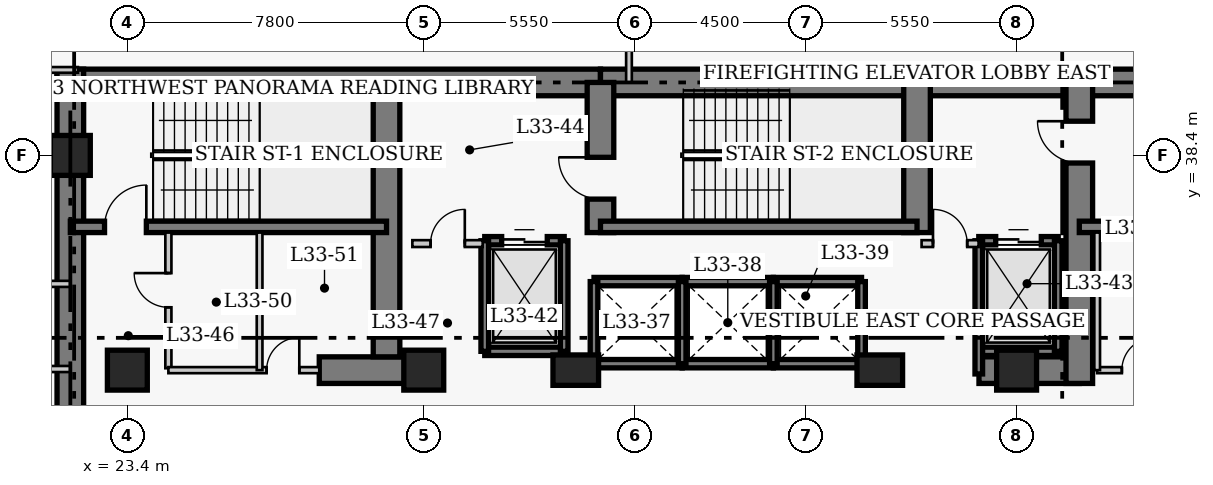
"""IFC4 building model, lengths in metres.
Left out: names, types, materials, properties, quantities, classifications, styles, units other than length and angle.
Written with IfcOpenShell. Run it as: python <this file> out.ifc"""

import sys

from ifc_helpers import new_model, si_unit, direction, frame, frame_2d, origin, origin_2d, place, context, subcontext, project, spatial, rectangle, extrude, element, fill, save


model = new_model("IFC4")
c1 = context("Model", 3, precision=1e-05, world=origin(), true_north=direction((0.0, 1.0)))
c2 = subcontext(c1, "Body", "Model", "MODEL_VIEW")
j1 = project(units=[si_unit("LENGTHUNIT", "METRE"), si_unit("PLANEANGLEUNIT", "RADIAN")], contexts=[c1])
p1 = place(None, origin())
s1 = spatial("IfcSite", under=j1, at=p1, CompositionType="ELEMENT")
p2 = place(p1, origin())
s2 = spatial("IfcBuilding", under=s1, at=p2, CompositionType="ELEMENT")
p3 = place(p2, frame((0.0, 0.0, 134.6)))
s3 = spatial("IfcBuildingStorey", under=s2, at=p3, CompositionType="ELEMENT", Elevation=134.6)
p4 = place(p3, frame((21.55, 40.32, 0.0), z_axis=(0.0, 0.0, 1.0), x_axis=(1.0, 0.0, 0.0)))
e1 = element("IfcWall", 1, at=p4, inside=s3, PredefinedType="SHEAR", context=c2, shape_type="SweptSolid", body=[
    extrude(rectangle(XDim=14.3, YDim=0.7, at=frame_2d((7.15, 0.0))), origin(), (0.0, 0.0, 1.0), 3.8),
])
p5 = place(p3, frame((35.85, 40.32, 0.0), z_axis=(0.0, 0.0, 1.0), x_axis=(1.0, 0.0, 0.0)))
e2 = element("IfcWall", 2, at=p5, inside=s3, PredefinedType="SHEAR", context=c2, shape_type="SweptSolid", body=[
    extrude(rectangle(XDim=12.6, YDim=0.7, at=frame_2d((6.3, 0.0))), origin(), (0.0, 0.0, 1.0), 3.8),
])
p6 = place(p3, frame((48.45, 40.32, 0.0), z_axis=(0.0, 0.0, 1.0), x_axis=(1.0, 0.0, 0.0)))
e3 = element("IfcWall", 3, at=p6, inside=s3, PredefinedType="SHEAR", context=c2, shape_type="SweptSolid", body=[
    extrude(rectangle(XDim=8.77, YDim=0.7, at=frame_2d((4.385, 0.0))), origin(), (0.0, 0.0, 1.0), 3.8),
])
p7 = place(p3, frame((21.9, 27.05, 0.0), z_axis=(0.0, 0.0, 1.0), x_axis=(0.0, 1.0, 0.0)))
e4 = element("IfcWall", 4, at=p7, inside=s3, PredefinedType="SHEAR", context=c2, shape_type="SweptSolid", body=[
    extrude(rectangle(XDim=13.62, YDim=0.7, at=frame_2d((6.81, 0.0))), origin(), (0.0, 0.0, 1.0), 3.8),
])
p8 = place(p3, frame((28.45, 32.75, 0.0), z_axis=(0.0, 0.0, 1.0), x_axis=(1.0, 0.0, 0.0)))
e5 = element("IfcWall", 5, at=p8, inside=s3, PredefinedType="SHEAR", context=c2, shape_type="SweptSolid", body=[
    extrude(rectangle(XDim=2.4, YDim=0.7, at=frame_2d((1.2, 0.0))), origin(), (0.0, 0.0, 1.0), 3.8),
])
p9 = place(p3, frame((45.81, 32.75, 0.0), z_axis=(0.0, 0.0, 1.0), x_axis=(1.0, 0.0, 0.0)))
e6 = element("IfcWall", 6, at=p9, inside=s3, PredefinedType="SHEAR", context=c2, shape_type="SweptSolid", body=[
    extrude(rectangle(XDim=2.64, YDim=0.7, at=frame_2d((1.32, 0.0))), origin(), (0.0, 0.0, 1.0), 3.8),
])
p10 = place(p3, frame((30.22, 33.1, 0.0), z_axis=(0.0, 0.0, 1.0), x_axis=(0.0, 1.0, 0.0)))
e7 = element("IfcWall", 7, at=p10, inside=s3, PredefinedType="SHEAR", context=c2, shape_type="SweptSolid", body=[
    extrude(rectangle(XDim=7.22, YDim=0.7, at=frame_2d((3.61, 0.0))), origin(), (0.0, 0.0, 1.0), 3.8),
])
p11 = place(p3, frame((35.85, 36.37, 0.0), z_axis=(0.0, 0.0, 1.0), x_axis=(0.0, 1.0, 0.0)))
e8 = element("IfcWall", 8, at=p11, inside=s3, PredefinedType="SHEAR", context=c2, shape_type="SweptSolid", body=[
    extrude(rectangle(XDim=3.95, YDim=0.7, at=frame_2d((1.975, 0.0))), origin(), (0.0, 0.0, 1.0), 3.8),
])
p12 = place(p11, frame((0.88, 0.0, 0.0)))
e9 = element("IfcOpeningElement", 9, at=p12, cuts=e8, PredefinedType="OPENING", context=c2, shape_type="SweptSolid", body=[
    extrude(rectangle(XDim=1.1, YDim=2.15, at=frame_2d((0.55, 1.075))), frame((0.0, 0.36, 0.0), z_axis=(0.0, -1.0, 0.0), x_axis=(1.0, 0.0, 0.0)), (0.0, 0.0, 1.0), 0.72),
])
p13 = place(p3, frame((44.18, 36.37, 0.0), z_axis=(0.0, 0.0, 1.0), x_axis=(0.0, 1.0, 0.0)))
e10 = element("IfcWall", 10, at=p13, inside=s3, PredefinedType="SHEAR", context=c2, shape_type="SweptSolid", body=[
    extrude(rectangle(XDim=3.95, YDim=0.7, at=frame_2d((1.975, 0.0))), origin(), (0.0, 0.0, 1.0), 3.8),
])
p14 = place(p3, frame((48.45, 32.4, 0.0), z_axis=(0.0, 0.0, 1.0), x_axis=(0.0, 1.0, 0.0)))
e11 = element("IfcWall", 11, at=p14, inside=s3, PredefinedType="SHEAR", context=c2, shape_type="SweptSolid", body=[
    extrude(rectangle(XDim=7.92, YDim=0.7, at=frame_2d((3.96, 0.0))), origin(), (0.0, 0.0, 1.0), 3.8),
])
p15 = place(p14, frame((5.8, 0.0, 0.0)))
e12 = element("IfcOpeningElement", 12, at=p15, cuts=e11, PredefinedType="OPENING", context=c2, shape_type="SweptSolid", body=[
    extrude(rectangle(XDim=1.1, YDim=2.15, at=frame_2d((0.55, 1.075))), frame((0.0, 0.36, 0.0), z_axis=(0.0, -1.0, 0.0), x_axis=(1.0, 0.0, 0.0)), (0.0, 0.0, 1.0), 0.72),
])
p16 = place(p3, frame((21.9, 36.52, 0.0), z_axis=(0.0, 0.0, 1.0), x_axis=(1.0, 0.0, 0.0)))
e13 = element("IfcWall", 13, at=p16, inside=s3, PredefinedType="SHEAR", context=c2, shape_type="SweptSolid", body=[
    extrude(rectangle(XDim=8.32, YDim=0.3, at=frame_2d((4.16, 0.0))), origin(), (0.0, 0.0, 1.0), 3.8),
])
p17 = place(p16, frame((0.9, 0.0, 0.0)))
e14 = element("IfcOpeningElement", 14, at=p17, cuts=e13, PredefinedType="OPENING", context=c2, shape_type="SweptSolid", body=[
    extrude(rectangle(XDim=1.1, YDim=2.15, at=frame_2d((0.55, 1.075))), frame((0.0, 0.16, 0.0), z_axis=(0.0, -1.0, 0.0), x_axis=(1.0, 0.0, 0.0)), (0.0, 0.0, 1.0), 0.32),
])
p18 = place(p3, frame((35.85, 36.52, 0.0), z_axis=(0.0, 0.0, 1.0), x_axis=(1.0, 0.0, 0.0)))
e15 = element("IfcWall", 15, at=p18, inside=s3, PredefinedType="SHEAR", context=c2, shape_type="SweptSolid", body=[
    extrude(rectangle(XDim=8.33, YDim=0.3, at=frame_2d((4.165, 0.0))), origin(), (0.0, 0.0, 1.0), 3.8),
])
p19 = place(p3, frame((48.45, 36.52, 0.0), z_axis=(0.0, 0.0, 1.0), x_axis=(1.0, 0.0, 0.0)))
e16 = element("IfcWall", 16, at=p19, inside=s3, PredefinedType="SHEAR", context=c2, shape_type="SweptSolid", body=[
    extrude(rectangle(XDim=8.42, YDim=0.3, at=frame_2d((4.21, 0.0))), origin(), (0.0, 0.0, 1.0), 3.8),
])
for number, where, z_axis, x_axis in (
    (17, (21.9, 38.4, 0.0), (0.0, 0.0, 1.0), (1.0, 0.0, 0.0)),
    (18, (23.4, 32.75, 0.0), (0.0, 0.0, 1.0), (1.0, 0.0, 0.0)),
    (19, (31.2, 32.75, 0.0), (0.0, 0.0, 1.0), (1.0, 0.0, 0.0)),
):
    element("IfcColumn", number, at=place(p3, frame(where, z_axis=z_axis, x_axis=x_axis)), inside=s3, PredefinedType="COLUMN", context=c2, shape_type="SweptSolid", body=[
        extrude(rectangle(XDim=1.05, YDim=1.05, at=origin_2d()), origin(), (0.0, 0.0, 1.0), 3.8),
    ])
for number, where, z_axis, x_axis in (
    (20, (35.2, 32.75, 0.0), (0.0, 0.0, 1.0), (1.0, 0.0, 0.0)),
    (21, (43.2, 32.75, 0.0), (0.0, 0.0, 1.0), (1.0, 0.0, 0.0)),
):
    element("IfcColumn", number, at=place(p3, frame(where, z_axis=z_axis, x_axis=x_axis)), inside=s3, PredefinedType="COLUMN", context=c2, shape_type="SweptSolid", body=[
        extrude(rectangle(XDim=1.2, YDim=0.8, at=origin_2d()), origin(), (0.0, 0.0, 1.0), 3.8),
    ])
p20 = place(p3, frame((46.8, 32.75, 0.0), z_axis=(0.0, 0.0, 1.0), x_axis=(1.0, 0.0, 0.0)))
e22 = element("IfcColumn", 22, at=p20, inside=s3, PredefinedType="COLUMN", context=c2, shape_type="SweptSolid", body=[
    extrude(rectangle(XDim=1.05, YDim=1.05, at=origin_2d()), origin(), (0.0, 0.0, 1.0), 3.8),
])
for number, where, z_axis, x_axis in (
    (23, (35.68, 35.08, 0.0), (0.0, 0.0, 1.0), (1.0, 0.0, 0.0)),
    (24, (35.68, 32.92, 0.0), (0.0, 0.0, 1.0), (1.0, 0.0, 0.0)),
):
    element("IfcWall", number, at=place(p3, frame(where, z_axis=z_axis, x_axis=x_axis)), inside=s3, PredefinedType="SHEAR", context=c2, shape_type="SweptSolid", body=[
        extrude(rectangle(XDim=2.32, YDim=0.22, at=frame_2d((1.16, 0.0))), origin(), (0.0, 0.0, 1.0), 3.8),
    ])
p21 = place(p3, frame((35.68, 32.92, 0.0), z_axis=(0.0, 0.0, 1.0), x_axis=(0.0, 1.0, 0.0)))
e25 = element("IfcWall", 25, at=p21, inside=s3, PredefinedType="SHEAR", context=c2, shape_type="SweptSolid", body=[
    extrude(rectangle(XDim=2.16, YDim=0.2, at=frame_2d((1.08, 0.0))), origin(), (0.0, 0.0, 1.0), 3.8),
])
for number, where, z_axis, x_axis in (
    (26, (38.0, 35.08, 0.0), (0.0, 0.0, 1.0), (1.0, 0.0, 0.0)),
    (27, (38.0, 32.92, 0.0), (0.0, 0.0, 1.0), (1.0, 0.0, 0.0)),
):
    element("IfcWall", number, at=place(p3, frame(where, z_axis=z_axis, x_axis=x_axis)), inside=s3, PredefinedType="SHEAR", context=c2, shape_type="SweptSolid", body=[
        extrude(rectangle(XDim=2.4, YDim=0.22, at=frame_2d((1.2, 0.0))), origin(), (0.0, 0.0, 1.0), 3.8),
    ])
p22 = place(p3, frame((38.0, 32.92, 0.0), z_axis=(0.0, 0.0, 1.0), x_axis=(0.0, 1.0, 0.0)))
e28 = element("IfcWall", 28, at=p22, inside=s3, PredefinedType="SHEAR", context=c2, shape_type="SweptSolid", body=[
    extrude(rectangle(XDim=2.16, YDim=0.2, at=frame_2d((1.08, 0.0))), origin(), (0.0, 0.0, 1.0), 3.8),
])
for number, where, z_axis, x_axis in (
    (29, (40.4, 35.08, 0.0), (0.0, 0.0, 1.0), (1.0, 0.0, 0.0)),
    (30, (40.4, 32.92, 0.0), (0.0, 0.0, 1.0), (1.0, 0.0, 0.0)),
):
    element("IfcWall", number, at=place(p3, frame(where, z_axis=z_axis, x_axis=x_axis)), inside=s3, PredefinedType="SHEAR", context=c2, shape_type="SweptSolid", body=[
        extrude(rectangle(XDim=2.32, YDim=0.22, at=frame_2d((1.16, 0.0))), origin(), (0.0, 0.0, 1.0), 3.8),
    ])
for number, where, z_axis, x_axis in (
    (31, (40.4, 32.92, 0.0), (0.0, 0.0, 1.0), (0.0, 1.0, 0.0)),
    (32, (42.72, 32.92, 0.0), (0.0, 0.0, 1.0), (0.0, 1.0, 0.0)),
):
    element("IfcWall", number, at=place(p3, frame(where, z_axis=z_axis, x_axis=x_axis)), inside=s3, PredefinedType="SHEAR", context=c2, shape_type="SweptSolid", body=[
        extrude(rectangle(XDim=2.16, YDim=0.2, at=frame_2d((1.08, 0.0))), origin(), (0.0, 0.0, 1.0), 3.8),
    ])
p23 = place(p3, frame((32.805, 36.155, 0.0), z_axis=(0.0, 0.0, 1.0), x_axis=(1.0, 0.0, 0.0)))
e33 = element("IfcWall", 33, at=p23, inside=s3, PredefinedType="SHEAR", context=c2, shape_type="SweptSolid", body=[
    extrude(rectangle(XDim=2.09, YDim=0.22, at=frame_2d((1.045, 0.0))), origin(), (0.0, 0.0, 1.0), 3.8),
])
p24 = place(p23, frame((0.445, 0.0, 0.0)))
e34 = element("IfcOpeningElement", 34, at=p24, cuts=e33, PredefinedType="OPENING", context=c2, shape_type="SweptSolid", body=[
    extrude(rectangle(XDim=1.2, YDim=2.15, at=frame_2d((0.6, 1.075))), frame((0.0, 0.12, 0.0), z_axis=(0.0, -1.0, 0.0), x_axis=(1.0, 0.0, 0.0)), (0.0, 0.0, 1.0), 0.24),
])
p25 = place(p3, frame((32.805, 33.245, 0.0), z_axis=(0.0, 0.0, 1.0), x_axis=(1.0, 0.0, 0.0)))
e35 = element("IfcWall", 35, at=p25, inside=s3, PredefinedType="SHEAR", context=c2, shape_type="SweptSolid", body=[
    extrude(rectangle(XDim=2.09, YDim=0.22, at=frame_2d((1.045, 0.0))), origin(), (0.0, 0.0, 1.0), 3.8),
])
for number, where, z_axis, x_axis in (
    (36, (32.805, 33.245, 0.0), (0.0, 0.0, 1.0), (0.0, 1.0, 0.0)),
    (37, (34.895, 33.245, 0.0), (0.0, 0.0, 1.0), (0.0, 1.0, 0.0)),
):
    element("IfcWall", number, at=place(p3, frame(where, z_axis=z_axis, x_axis=x_axis)), inside=s3, PredefinedType="SHEAR", context=c2, shape_type="SweptSolid", body=[
        extrude(rectangle(XDim=2.91, YDim=0.2, at=frame_2d((1.455, 0.0))), origin(), (0.0, 0.0, 1.0), 3.8),
    ])
p26 = place(p3, frame((45.805, 36.155, 0.0), z_axis=(0.0, 0.0, 1.0), x_axis=(1.0, 0.0, 0.0)))
e38 = element("IfcWall", 38, at=p26, inside=s3, PredefinedType="SHEAR", context=c2, shape_type="SweptSolid", body=[
    extrude(rectangle(XDim=2.09, YDim=0.22, at=frame_2d((1.045, 0.0))), origin(), (0.0, 0.0, 1.0), 3.8),
])
p27 = place(p26, frame((0.445, 0.0, 0.0)))
e39 = element("IfcOpeningElement", 39, at=p27, cuts=e38, PredefinedType="OPENING", context=c2, shape_type="SweptSolid", body=[
    extrude(rectangle(XDim=1.2, YDim=2.15, at=frame_2d((0.6, 1.075))), frame((0.0, 0.12, 0.0), z_axis=(0.0, -1.0, 0.0), x_axis=(1.0, 0.0, 0.0)), (0.0, 0.0, 1.0), 0.24),
])
p28 = place(p3, frame((45.805, 33.245, 0.0), z_axis=(0.0, 0.0, 1.0), x_axis=(1.0, 0.0, 0.0)))
e40 = element("IfcWall", 40, at=p28, inside=s3, PredefinedType="SHEAR", context=c2, shape_type="SweptSolid", body=[
    extrude(rectangle(XDim=2.09, YDim=0.22, at=frame_2d((1.045, 0.0))), origin(), (0.0, 0.0, 1.0), 3.8),
])
p29 = place(p3, frame((45.805, 32.65, 0.0), z_axis=(0.0, 0.0, 1.0), x_axis=(0.0, 1.0, 0.0)))
e41 = element("IfcWall", 41, at=p29, inside=s3, PredefinedType="SHEAR", context=c2, shape_type="SweptSolid", body=[
    extrude(rectangle(XDim=3.505, YDim=0.2, at=frame_2d((1.752, 0.0))), origin(), (0.0, 0.0, 1.0), 3.8),
])
p30 = place(p3, frame((47.895, 33.245, 0.0), z_axis=(0.0, 0.0, 1.0), x_axis=(0.0, 1.0, 0.0)))
e42 = element("IfcWall", 42, at=p30, inside=s3, PredefinedType="SHEAR", context=c2, shape_type="SweptSolid", body=[
    extrude(rectangle(XDim=2.91, YDim=0.2, at=frame_2d((1.455, 0.0))), origin(), (0.0, 0.0, 1.0), 3.8),
])
p31 = place(p3, frame((30.9, 36.08, 0.0), z_axis=(0.0, 0.0, 1.0), x_axis=(1.0, 0.0, 0.0)))
e43 = element("IfcWall", 43, at=p31, inside=s3, PredefinedType="PARTITIONING", context=c2, shape_type="SweptSolid", body=[
    extrude(rectangle(XDim=1.85, YDim=0.18, at=frame_2d((0.925, 0.0))), origin(), (0.0, 0.0, 1.0), 3.55),
])
p32 = place(p31, frame((0.48, 0.0, 0.0)))
e44 = element("IfcOpeningElement", 44, at=p32, cuts=e43, PredefinedType="OPENING", context=c2, shape_type="SweptSolid", body=[
    extrude(rectangle(XDim=0.9, YDim=2.15, at=frame_2d((0.45, 1.075))), frame((0.0, 0.1, 0.0), z_axis=(0.0, -1.0, 0.0), x_axis=(1.0, 0.0, 0.0)), (0.0, 0.0, 1.0), 0.2),
])
p33 = place(p3, frame((44.3, 36.08, 0.0), z_axis=(0.0, 0.0, 1.0), x_axis=(1.0, 0.0, 0.0)))
e45 = element("IfcWall", 45, at=p33, inside=s3, PredefinedType="PARTITIONING", context=c2, shape_type="SweptSolid", body=[
    extrude(rectangle(XDim=1.5, YDim=0.18, at=frame_2d((0.75, 0.0))), origin(), (0.0, 0.0, 1.0), 3.55),
])
p34 = place(p33, frame((0.3, 0.0, 0.0)))
e46 = element("IfcOpeningElement", 46, at=p34, cuts=e45, PredefinedType="OPENING", context=c2, shape_type="SweptSolid", body=[
    extrude(rectangle(XDim=0.9, YDim=2.15, at=frame_2d((0.45, 1.075))), frame((0.0, 0.1, 0.0), z_axis=(0.0, -1.0, 0.0), x_axis=(1.0, 0.0, 0.0)), (0.0, 0.0, 1.0), 0.2),
])
p35 = place(p3, frame((24.48, 32.8, 0.0), z_axis=(0.0, 0.0, 1.0), x_axis=(0.0, 1.0, 0.0)))
e47 = element("IfcWall", 47, at=p35, inside=s3, PredefinedType="PARTITIONING", context=c2, shape_type="SweptSolid", body=[
    extrude(rectangle(XDim=3.57, YDim=0.16, at=frame_2d((1.785, 0.0))), origin(), (0.0, 0.0, 1.0), 3.55),
])
p36 = place(p35, frame((1.604, 0.0, 0.0)))
e48 = element("IfcOpeningElement", 48, at=p36, cuts=e47, PredefinedType="OPENING", context=c2, shape_type="SweptSolid", body=[
    extrude(rectangle(XDim=0.9, YDim=2.1, at=frame_2d((0.45, 1.05))), frame((0.0, 0.09, 0.0), z_axis=(0.0, -1.0, 0.0), x_axis=(1.0, 0.0, 0.0)), (0.0, 0.0, 1.0), 0.18),
])
p37 = place(p3, frame((24.48, 32.75, 0.0), z_axis=(0.0, 0.0, 1.0), x_axis=(1.0, 0.0, 0.0)))
e49 = element("IfcWall", 49, at=p37, inside=s3, PredefinedType="PARTITIONING", context=c2, shape_type="SweptSolid", body=[
    extrude(rectangle(XDim=3.97, YDim=0.16, at=frame_2d((1.985, 0.0))), origin(), (0.0, 0.0, 1.0), 3.55),
])
p38 = place(p37, frame((2.585, 0.0, 0.0)))
e50 = element("IfcOpeningElement", 50, at=p38, cuts=e49, PredefinedType="OPENING", context=c2, shape_type="SweptSolid", body=[
    extrude(rectangle(XDim=0.86, YDim=2.05, at=frame_2d((0.43, 1.025))), frame((0.0, 0.09, 0.0), z_axis=(0.0, -1.0, 0.0), x_axis=(1.0, 0.0, 0.0)), (0.0, 0.0, 1.0), 0.18),
])
p39 = place(p3, frame((48.92, 32.75, 0.0), z_axis=(0.0, 0.0, 1.0), x_axis=(1.0, 0.0, 0.0)))
e51 = element("IfcWall", 51, at=p39, inside=s3, PredefinedType="PARTITIONING", context=c2, shape_type="SweptSolid", body=[
    extrude(rectangle(XDim=2.2, YDim=0.16, at=frame_2d((1.1, 0.0))), origin(), (0.0, 0.0, 1.0), 3.55),
])
p40 = place(p39, frame((0.65, 0.0, 0.0)))
e52 = element("IfcOpeningElement", 52, at=p40, cuts=e51, PredefinedType="OPENING", context=c2, shape_type="SweptSolid", body=[
    extrude(rectangle(XDim=0.86, YDim=2.05, at=frame_2d((0.43, 1.025))), frame((0.0, 0.09, 0.0), z_axis=(0.0, -1.0, 0.0), x_axis=(1.0, 0.0, 0.0)), (0.0, 0.0, 1.0), 0.18),
])
for number, where, z_axis, x_axis in (
    (53, (48.92, 32.75, 0.0), (0.0, 0.0, 1.0), (0.0, 1.0, 0.0)),
    (54, (26.88, 32.75, 0.0), (0.0, 0.0, 1.0), (0.0, 1.0, 0.0)),
):
    element("IfcWall", number, at=place(p3, frame(where, z_axis=z_axis, x_axis=x_axis)), inside=s3, PredefinedType="PARTITIONING", context=c2, shape_type="SweptSolid", body=[
        extrude(rectangle(XDim=3.62, YDim=0.15, at=frame_2d((1.81, 0.0))), origin(), (0.0, 0.0, 1.0), 3.55),
    ])
for number, where, z_axis, x_axis in (
    (55, (20.46, 35.02, 0.0), (0.0, 0.0, 1.0), (1.0, 0.0, 0.0)),
    (56, (20.46, 32.78, 0.0), (0.0, 0.0, 1.0), (1.0, 0.0, 0.0)),
):
    element("IfcWall", number, at=place(p3, frame(where, z_axis=z_axis, x_axis=x_axis)), inside=s3, PredefinedType="PARTITIONING", context=c2, shape_type="SweptSolid", body=[
        extrude(rectangle(XDim=1.44, YDim=0.16, at=frame_2d((0.72, 0.0))), origin(), (0.0, 0.0, 1.0), 3.55),
    ])
p41 = place(p3, frame((18.24, 40.65, 0.0), z_axis=(0.0, 0.0, 1.0), x_axis=(1.0, 0.0, 0.0)))
e57 = element("IfcWall", 57, at=p41, inside=s3, PredefinedType="PARTITIONING", context=c2, shape_type="SweptSolid", body=[
    extrude(rectangle(XDim=3.86, YDim=0.15, at=frame_2d((1.93, 0.0))), origin(), (0.0, 0.0, 1.0), 3.55),
])
p42 = place(p41, frame((0.55, 0.0, 0.0)))
e58 = element("IfcOpeningElement", 58, at=p42, cuts=e57, PredefinedType="OPENING", context=c2, shape_type="SweptSolid", body=[
    extrude(rectangle(XDim=1.0, YDim=2.15, at=frame_2d((0.5, 1.075))), frame((0.0, 0.085, 0.0), z_axis=(0.0, -1.0, 0.0), x_axis=(1.0, 0.0, 0.0)), (0.0, 0.0, 1.0), 0.17),
])
p43 = place(p3, frame((36.6, 40.32, 0.0), z_axis=(0.0, 0.0, 1.0), x_axis=(0.0, 1.0, 0.0)))
e59 = element("IfcWall", 59, at=p43, inside=s3, PredefinedType="PARTITIONING", context=c2, shape_type="SweptSolid", body=[
    extrude(rectangle(XDim=1.845, YDim=0.15, at=frame_2d((0.922, 0.0))), origin(), (0.0, 0.0, 1.0), 3.55),
])
p44 = place(p24, origin())
e60 = element("IfcDoor", 60, at=p44, inside=s3, OperationType="DOUBLE_DOOR_SLIDING", PredefinedType="DOOR", context=c2, shape_type="SweptSolid", body=[
    extrude(rectangle(XDim=1.2, YDim=2.15, at=frame_2d((0.6, 1.075))), frame((0.0, 0.025, 0.0), z_axis=(0.0, -1.0, 0.0), x_axis=(1.0, 0.0, 0.0)), (0.0, 0.0, 1.0), 0.05),
])
fill(e34, e60)
p45 = place(p27, origin())
e61 = element("IfcDoor", 61, at=p45, inside=s3, OperationType="DOUBLE_DOOR_SLIDING", PredefinedType="DOOR", context=c2, shape_type="SweptSolid", body=[
    extrude(rectangle(XDim=1.2, YDim=2.15, at=frame_2d((0.6, 1.075))), frame((0.0, 0.025, 0.0), z_axis=(0.0, -1.0, 0.0), x_axis=(1.0, 0.0, 0.0)), (0.0, 0.0, 1.0), 0.05),
])
fill(e39, e61)
p46 = place(p32, origin())
e62 = element("IfcDoor", 62, at=p46, inside=s3, OperationType="SINGLE_SWING_RIGHT", PredefinedType="DOOR", context=c2, shape_type="SweptSolid", body=[
    extrude(rectangle(XDim=0.9, YDim=2.15, at=frame_2d((0.45, 1.075))), frame((0.0, 0.025, 0.0), z_axis=(0.0, -1.0, 0.0), x_axis=(1.0, 0.0, 0.0)), (0.0, 0.0, 1.0), 0.05),
])
fill(e44, e62)
p47 = place(p34, origin())
e63 = element("IfcDoor", 63, at=p47, inside=s3, OperationType="SINGLE_SWING_LEFT", PredefinedType="DOOR", context=c2, shape_type="SweptSolid", body=[
    extrude(rectangle(XDim=0.9, YDim=2.15, at=frame_2d((0.45, 1.075))), frame((0.0, 0.025, 0.0), z_axis=(0.0, -1.0, 0.0), x_axis=(1.0, 0.0, 0.0)), (0.0, 0.0, 1.0), 0.05),
])
fill(e46, e63)
p48 = place(p36, origin())
e64 = element("IfcDoor", 64, at=p48, inside=s3, OperationType="SINGLE_SWING_RIGHT", PredefinedType="DOOR", context=c2, shape_type="SweptSolid", body=[
    extrude(rectangle(XDim=0.9, YDim=2.1, at=frame_2d((0.45, 1.05))), frame((0.0, 0.025, 0.0), z_axis=(0.0, -1.0, 0.0), x_axis=(1.0, 0.0, 0.0)), (0.0, 0.0, 1.0), 0.05),
])
fill(e48, e64)
p49 = place(p38, origin())
e65 = element("IfcDoor", 65, at=p49, inside=s3, OperationType="SINGLE_SWING_RIGHT", PredefinedType="DOOR", context=c2, shape_type="SweptSolid", body=[
    extrude(rectangle(XDim=0.86, YDim=2.05, at=frame_2d((0.43, 1.025))), frame((0.0, 0.025, 0.0), z_axis=(0.0, -1.0, 0.0), x_axis=(1.0, 0.0, 0.0)), (0.0, 0.0, 1.0), 0.05),
])
fill(e50, e65)
p50 = place(p40, origin())
e66 = element("IfcDoor", 66, at=p50, inside=s3, OperationType="SINGLE_SWING_RIGHT", PredefinedType="DOOR", context=c2, shape_type="SweptSolid", body=[
    extrude(rectangle(XDim=0.86, YDim=2.05, at=frame_2d((0.43, 1.025))), frame((0.0, 0.025, 0.0), z_axis=(0.0, -1.0, 0.0), x_axis=(1.0, 0.0, 0.0)), (0.0, 0.0, 1.0), 0.05),
])
fill(e52, e66)
p51 = place(p17, origin())
e67 = element("IfcDoor", 67, at=p51, inside=s3, OperationType="SINGLE_SWING_RIGHT", PredefinedType="DOOR", context=c2, shape_type="SweptSolid", body=[
    extrude(rectangle(XDim=1.1, YDim=2.15, at=frame_2d((0.55, 1.075))), frame((0.0, 0.025, 0.0), z_axis=(0.0, -1.0, 0.0), x_axis=(1.0, 0.0, 0.0)), (0.0, 0.0, 1.0), 0.05),
])
fill(e14, e67)
p52 = place(p12, origin())
e68 = element("IfcDoor", 68, at=p52, inside=s3, OperationType="SINGLE_SWING_RIGHT", PredefinedType="DOOR", context=c2, shape_type="SweptSolid", body=[
    extrude(rectangle(XDim=1.1, YDim=2.15, at=frame_2d((0.55, 1.075))), frame((0.0, 0.025, 0.0), z_axis=(0.0, -1.0, 0.0), x_axis=(1.0, 0.0, 0.0)), (0.0, 0.0, 1.0), 0.05),
])
fill(e9, e68)
p53 = place(p15, origin())
e69 = element("IfcDoor", 69, at=p53, inside=s3, OperationType="SINGLE_SWING_RIGHT", PredefinedType="DOOR", context=c2, shape_type="SweptSolid", body=[
    extrude(rectangle(XDim=1.1, YDim=2.15, at=frame_2d((0.55, 1.075))), frame((0.0, 0.025, 0.0), z_axis=(0.0, -1.0, 0.0), x_axis=(1.0, 0.0, 0.0)), (0.0, 0.0, 1.0), 0.05),
])
fill(e12, e69)
save(model, sys.argv[1])
